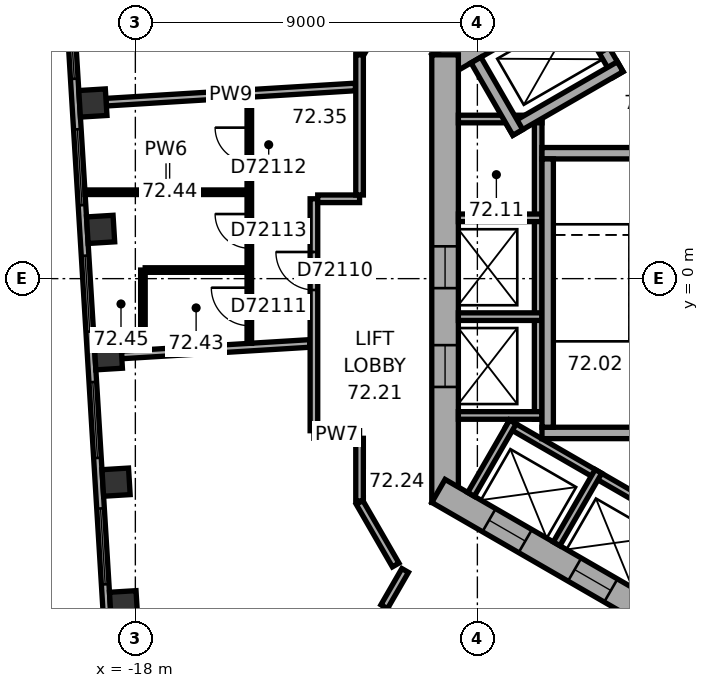
"""IFC4 building model, lengths in metres.
Left out: names, types, materials, properties, quantities, classifications, styles, units other than length and angle.
Written with IfcOpenShell. Run it as: python <this file> out.ifc"""

import sys

from ifc_helpers import new_model, si_unit, direction, frame, frame_2d, origin, origin_2d, place, context, subcontext, project, spatial, rectangle, extrude, element, fill, save


model = new_model("IFC4")
c1 = context("Model", 3, precision=1e-05, world=origin(), true_north=direction((0.0, 1.0)))
c2 = subcontext(c1, "Body", "Model", "MODEL_VIEW")
j1 = project(units=[si_unit("LENGTHUNIT", "METRE"), si_unit("PLANEANGLEUNIT", "RADIAN")], contexts=[c1])
p1 = place(None, origin())
s1 = spatial("IfcSite", under=j1, at=p1, CompositionType="ELEMENT")
p2 = place(p1, origin())
s2 = spatial("IfcBuilding", under=s1, at=p2, CompositionType="ELEMENT")
p3 = place(p2, frame((0.0, 0.0, 293.1)))
s3 = spatial("IfcBuildingStorey", under=s2, at=p3, CompositionType="ELEMENT", Elevation=293.1)
for number, where, z_axis, x_axis in (
    (1, (-19.118, 4.621, 0.0), (0.0, 0.0, 1.0), (0.061, -0.998, 0.0)),
    (2, (-18.914, 1.296, 0.0), (0.0, 0.0, 1.0), (0.061, -0.998, 0.0)),
    (3, (-18.711, -2.03, 0.0), (0.0, 0.0, 1.0), (0.061, -0.998, 0.0)),
    (4, (-18.508, -5.355, 0.0), (0.0, 0.0, 1.0), (0.061, -0.998, 0.0)),
):
    element("IfcColumn", number, at=place(p3, frame(where, z_axis=z_axis, x_axis=x_axis)), inside=s3, PredefinedType="COLUMN", context=c2, shape_type="SweptSolid", body=[
        extrude(rectangle(XDim=0.7, YDim=0.7, at=origin_2d()), origin(), (0.0, 0.0, 1.0), 3.7),
    ])
p4 = place(p3, frame((-18.304, -8.68, 0.0), z_axis=(0.0, 0.0, 1.0), x_axis=(0.061048539535, -0.998134798422, 0.0)))
e5 = element("IfcColumn", 5, at=p4, inside=s3, PredefinedType="COLUMN", context=c2, shape_type="SweptSolid", body=[
    extrude(rectangle(XDim=0.9, YDim=0.7, at=origin_2d()), origin(), (0.0, 0.0, 1.0), 3.7),
])
p5 = place(p3, frame((0.175, 11.475, 0.0), z_axis=(0.0, 0.0, 1.0), x_axis=(-0.866026453023, -0.499998182661, 0.0)))
e6 = element("IfcWall", 6, at=p5, inside=s3, PredefinedType="SHEAR", context=c2, shape_type="SweptSolid", body=[
    extrude(rectangle(XDim=11.778, YDim=0.7, at=frame_2d((5.889, 0.0))), origin(), (0.0, 0.0, 1.0), 3.7),
])
p6 = place(p5, frame((6.089, 0.0, 0.0)))
e7 = element("IfcOpeningElement", 7, at=p6, cuts=e6, PredefinedType="OPENING", context=c2, shape_type="SweptSolid", body=[
    extrude(rectangle(XDim=1.5, YDim=2.1, at=frame_2d((0.75, 1.05))), frame((0.0, 0.36, 0.0), z_axis=(0.0, -1.0, 0.0), x_axis=(1.0, 0.0, 0.0)), (0.0, 0.0, 1.0), 0.72),
])
p7 = place(p5, frame((2.939, 0.0, 0.0)))
e8 = element("IfcOpeningElement", 8, at=p7, cuts=e6, PredefinedType="OPENING", context=c2, shape_type="SweptSolid", body=[
    extrude(rectangle(XDim=0.9, YDim=2.1, at=frame_2d((0.45, 1.05))), frame((0.0, 0.36, 0.0), z_axis=(0.0, -1.0, 0.0), x_axis=(1.0, 0.0, 0.0)), (0.0, 0.0, 1.0), 0.72),
])
p8 = place(p3, frame((-9.85, 5.889, 0.0), z_axis=(0.0, 0.0, 1.0), x_axis=(0.0, -1.0, 0.0)))
e9 = element("IfcWall", 9, at=p8, inside=s3, PredefinedType="SHEAR", context=c2, shape_type="SweptSolid", body=[
    extrude(rectangle(XDim=11.778, YDim=0.7, at=frame_2d((5.889, 0.0))), origin(), (0.0, 0.0, 1.0), 3.7),
])
p9 = place(p8, frame((5.039, 0.0, 0.0)))
e10 = element("IfcOpeningElement", 10, at=p9, cuts=e9, PredefinedType="OPENING", context=c2, shape_type="SweptSolid", body=[
    extrude(rectangle(XDim=1.1, YDim=2.1, at=frame_2d((0.55, 1.05))), frame((0.0, 0.36, 0.0), z_axis=(0.0, -1.0, 0.0), x_axis=(1.0, 0.0, 0.0)), (0.0, 0.0, 1.0), 0.72),
])
p10 = place(p8, frame((7.639, 0.0, 0.0)))
e11 = element("IfcOpeningElement", 11, at=p10, cuts=e9, PredefinedType="OPENING", context=c2, shape_type="SweptSolid", body=[
    extrude(rectangle(XDim=1.1, YDim=2.1, at=frame_2d((0.55, 1.05))), frame((0.0, 0.36, 0.0), z_axis=(0.0, -1.0, 0.0), x_axis=(1.0, 0.0, 0.0)), (0.0, 0.0, 1.0), 0.72),
])
p11 = place(p3, frame((-10.025, -5.586, 0.0), z_axis=(0.0, 0.0, 1.0), x_axis=(0.866026453023, -0.499998182661, 0.0)))
e12 = element("IfcWall", 12, at=p11, inside=s3, PredefinedType="SHEAR", context=c2, shape_type="SweptSolid", body=[
    extrude(rectangle(XDim=11.778, YDim=0.7, at=frame_2d((5.889, 0.0))), origin(), (0.0, 0.0, 1.0), 3.7),
])
p12 = place(p11, frame((6.089, 0.0, 0.0)))
e13 = element("IfcOpeningElement", 13, at=p12, cuts=e12, PredefinedType="OPENING", context=c2, shape_type="SweptSolid", body=[
    extrude(rectangle(XDim=1.5, YDim=2.1, at=frame_2d((0.75, 1.05))), frame((0.0, 0.36, 0.0), z_axis=(0.0, -1.0, 0.0), x_axis=(1.0, 0.0, 0.0)), (0.0, 0.0, 1.0), 0.72),
])
p13 = place(p11, frame((1.539, 0.0, 0.0)))
e14 = element("IfcOpeningElement", 14, at=p13, cuts=e12, PredefinedType="OPENING", context=c2, shape_type="SweptSolid", body=[
    extrude(rectangle(XDim=1.1, YDim=2.1, at=frame_2d((0.55, 1.05))), frame((0.0, 0.36, 0.0), z_axis=(0.0, -1.0, 0.0), x_axis=(1.0, 0.0, 0.0)), (0.0, 0.0, 1.0), 0.72),
])
p14 = place(p11, frame((4.139, 0.0, 0.0)))
e15 = element("IfcOpeningElement", 15, at=p14, cuts=e12, PredefinedType="OPENING", context=c2, shape_type="SweptSolid", body=[
    extrude(rectangle(XDim=1.1, YDim=2.1, at=frame_2d((0.55, 1.05))), frame((0.0, 0.36, 0.0), z_axis=(0.0, -1.0, 0.0), x_axis=(1.0, 0.0, 0.0)), (0.0, 0.0, 1.0), 0.72),
])
p15 = place(p3, frame((-19.803, 8.454, 0.0), z_axis=(0.0, 0.0, 1.0), x_axis=(0.061036717565, -0.998135521414, 0.0)))
e16 = element("IfcWall", 16, at=p15, inside=s3, PredefinedType="STANDARD", context=c2, shape_type="SweptSolid", body=[
    extrude(rectangle(XDim=17.731, YDim=0.2, at=frame_2d((8.866, 0.0))), origin(), (0.0, 0.0, 1.0), 3.7),
])
p16 = place(p15, frame((1.202, 0.0, 0.9)))
e17 = element("IfcOpeningElement", 17, at=p16, cuts=e16, PredefinedType="OPENING", context=c2, shape_type="SweptSolid", body=[
    extrude(rectangle(XDim=2.0, YDim=2.0, at=frame_2d((1.0, 1.0))), frame((0.0, 0.11, 0.0), z_axis=(0.0, -1.0, 0.0), x_axis=(1.0, 0.0, 0.0)), (0.0, 0.0, 1.0), 0.22),
])
p17 = place(p15, frame((4.533, 0.0, 0.9)))
e18 = element("IfcOpeningElement", 18, at=p17, cuts=e16, PredefinedType="OPENING", context=c2, shape_type="SweptSolid", body=[
    extrude(rectangle(XDim=2.0, YDim=2.0, at=frame_2d((1.0, 1.0))), frame((0.0, 0.11, 0.0), z_axis=(0.0, -1.0, 0.0), x_axis=(1.0, 0.0, 0.0)), (0.0, 0.0, 1.0), 0.22),
])
p18 = place(p15, frame((7.865, 0.0, 0.9)))
e19 = element("IfcOpeningElement", 19, at=p18, cuts=e16, PredefinedType="OPENING", context=c2, shape_type="SweptSolid", body=[
    extrude(rectangle(XDim=2.0, YDim=2.0, at=frame_2d((1.0, 1.0))), frame((0.0, 0.11, 0.0), z_axis=(0.0, -1.0, 0.0), x_axis=(1.0, 0.0, 0.0)), (0.0, 0.0, 1.0), 0.22),
])
p19 = place(p15, frame((11.197, 0.0, 0.9)))
e20 = element("IfcOpeningElement", 20, at=p19, cuts=e16, PredefinedType="OPENING", context=c2, shape_type="SweptSolid", body=[
    extrude(rectangle(XDim=2.0, YDim=2.0, at=frame_2d((1.0, 1.0))), frame((0.0, 0.11, 0.0), z_axis=(0.0, -1.0, 0.0), x_axis=(1.0, 0.0, 0.0)), (0.0, 0.0, 1.0), 0.22),
])
p20 = place(p15, frame((14.528, 0.0, 0.9)))
e21 = element("IfcOpeningElement", 21, at=p20, cuts=e16, PredefinedType="OPENING", context=c2, shape_type="SweptSolid", body=[
    extrude(rectangle(XDim=2.0, YDim=2.0, at=frame_2d((1.0, 1.0))), frame((0.0, 0.11, 0.0), z_axis=(0.0, -1.0, 0.0), x_axis=(1.0, 0.0, 0.0)), (0.0, 0.0, 1.0), 0.22),
])
p21 = place(p3, frame((-7.4, 4.3, 0.0), z_axis=(0.0, 0.0, 1.0), x_axis=(0.0, -1.0, 0.0)))
e22 = element("IfcWall", 22, at=p21, inside=s3, PredefinedType="PARTITIONING", context=c2, shape_type="SweptSolid", body=[
    extrude(rectangle(XDim=8.0, YDim=0.2, at=frame_2d((4.0, 0.0))), origin(), (0.0, 0.0, 1.0), 3.42),
])
for number, where, z_axis, x_axis in (
    (23, (-7.3, 4.2, 0.0), (0.0, 0.0, 1.0), (-1.0, 0.0, 0.0)),
    (24, (-7.3, 1.6, 0.0), (0.0, 0.0, 1.0), (-1.0, 0.0, 0.0)),
    (25, (-7.3, -1.0, 0.0), (0.0, 0.0, 1.0), (-1.0, 0.0, 0.0)),
    (26, (-7.3, -3.6, 0.0), (0.0, 0.0, 1.0), (-1.0, 0.0, 0.0)),
):
    element("IfcWall", number, at=place(p3, frame(where, z_axis=z_axis, x_axis=x_axis)), inside=s3, PredefinedType="PARTITIONING", context=c2, shape_type="SweptSolid", body=[
        extrude(rectangle(XDim=2.2, YDim=0.2, at=frame_2d((1.1, 0.0))), origin(), (0.0, 0.0, 1.0), 3.42),
    ])
p22 = place(p3, frame((-8.203, -3.809, 0.0), z_axis=(0.0, 0.0, 1.0), x_axis=(0.866028230842, -0.499995103361, 0.0)))
e27 = element("IfcWall", 27, at=p22, inside=s3, PredefinedType="PARTITIONING", context=c2, shape_type="SweptSolid", body=[
    extrude(rectangle(XDim=5.4, YDim=0.2, at=frame_2d((2.7, 0.0))), origin(), (0.0, 0.0, 1.0), 3.42),
])
for number, where, z_axis, x_axis in (
    (28, (-8.067, -3.772, 0.0), (0.0, 0.0, 1.0), (-0.5, -0.866, 0.0)),
    (29, (-5.815, -5.072, 0.0), (0.0, 0.0, 1.0), (-0.5, -0.866, 0.0)),
):
    element("IfcWall", number, at=place(p3, frame(where, z_axis=z_axis, x_axis=x_axis)), inside=s3, PredefinedType="PARTITIONING", context=c2, shape_type="SweptSolid", body=[
        extrude(rectangle(XDim=2.2, YDim=0.2, at=frame_2d((1.1, 0.0))), origin(), (0.0, 0.0, 1.0), 3.42),
    ])
p23 = place(p3, frame((-2.6, 3.3, 0.0), z_axis=(0.0, 0.0, 1.0), x_axis=(-1.0, 0.0, 0.0)))
e30 = element("IfcWall", 30, at=p23, inside=s3, PredefinedType="SHEAR", context=c2, shape_type="SweptSolid", body=[
    extrude(rectangle(XDim=4.7, YDim=0.3, at=frame_2d((2.35, 0.0))), origin(), (0.0, 0.0, 1.0), 3.42),
])
p24 = place(p23, frame((0.8, 0.0, 0.0)))
e31 = element("IfcOpeningElement", 31, at=p24, cuts=e30, PredefinedType="OPENING", context=c2, shape_type="SweptSolid", body=[
    extrude(rectangle(XDim=1.2, YDim=2.1, at=frame_2d((0.6, 1.05))), frame((0.0, 0.16, 0.0), z_axis=(0.0, -1.0, 0.0), x_axis=(1.0, 0.0, 0.0)), (0.0, 0.0, 1.0), 0.32),
])
p25 = place(p3, frame((-2.6, -4.06, 0.0), z_axis=(0.0, 0.0, 1.0), x_axis=(-1.0, 0.0, 0.0)))
e32 = element("IfcWall", 32, at=p25, inside=s3, PredefinedType="SHEAR", context=c2, shape_type="SweptSolid", body=[
    extrude(rectangle(XDim=4.7, YDim=0.3, at=frame_2d((2.35, 0.0))), origin(), (0.0, 0.0, 1.0), 3.42),
])
p26 = place(p3, frame((-7.15, 3.15, 0.0), z_axis=(0.0, 0.0, 1.0), x_axis=(0.0, -1.0, 0.0)))
e33 = element("IfcWall", 33, at=p26, inside=s3, PredefinedType="SHEAR", context=c2, shape_type="SweptSolid", body=[
    extrude(rectangle(XDim=7.06, YDim=0.3, at=frame_2d((3.53, 0.0))), origin(), (0.0, 0.0, 1.0), 3.42),
])
p27 = place(p3, frame((-5.295, 5.372, 0.0), z_axis=(0.0, 0.0, 1.0), x_axis=(-0.500077893725, 0.86598042715, 0.0)))
e34 = element("IfcWall", 34, at=p27, inside=s3, PredefinedType="SHEAR", context=c2, shape_type="SweptSolid", body=[
    extrude(rectangle(XDim=2.2, YDim=0.3, at=frame_2d((1.1, 0.0))), origin(), (0.0, 0.0, 1.0), 3.42),
])
p28 = place(p27, frame((0.7, 0.0, 0.0)))
e35 = element("IfcOpeningElement", 35, at=p28, cuts=e34, PredefinedType="OPENING", context=c2, shape_type="SweptSolid", body=[
    extrude(rectangle(XDim=1.1, YDim=2.1, at=frame_2d((0.55, 1.05))), frame((0.0, 0.16, 0.0), z_axis=(0.0, -1.0, 0.0), x_axis=(1.0, 0.0, 0.0)), (0.0, 0.0, 1.0), 0.32),
])
p29 = place(p3, frame((-5.24, 5.577, 0.0), z_axis=(0.0, 0.0, 1.0), x_axis=(-0.866014461049, -0.500018952895, 0.0)))
e36 = element("IfcWall", 36, at=p29, inside=s3, PredefinedType="SHEAR", context=c2, shape_type="SweptSolid", body=[
    extrude(rectangle(XDim=3.35, YDim=0.3, at=frame_2d((1.675, 0.0))), origin(), (0.0, 0.0, 1.0), 3.42),
])
p30 = place(p3, frame((-7.937, 3.847, 0.0), z_axis=(0.0, 0.0, 1.0), x_axis=(-0.50002983664, 0.866008176907, 0.0)))
e37 = element("IfcWall", 37, at=p30, inside=s3, PredefinedType="SHEAR", context=c2, shape_type="SweptSolid", body=[
    extrude(rectangle(XDim=2.2, YDim=0.3, at=frame_2d((1.1, 0.0))), origin(), (0.0, 0.0, 1.0), 3.42),
])
p31 = place(p3, frame((-19.324, 2.273, 0.0), z_axis=(0.0, 0.0, 1.0), x_axis=(1.0, 0.0, 0.0)))
e38 = element("IfcWall", 38, at=p31, inside=s3, PredefinedType="PARTITIONING", context=c2, shape_type="SweptSolid", body=[
    extrude(rectangle(XDim=4.263, YDim=0.12, at=frame_2d((2.132, 0.0))), origin(), (0.0, 0.0, 1.0), 3.42),
])
p32 = place(p3, frame((-18.768, 4.643, 0.0), z_axis=(0.0, 0.0, 1.0), x_axis=(0.99813496285, 0.0610458511, 0.0)))
e39 = element("IfcWall", 39, at=p32, inside=s3, PredefinedType="PARTITIONING", context=c2, shape_type="SweptSolid", body=[
    extrude(rectangle(XDim=6.571, YDim=0.2, at=frame_2d((3.285, 0.0))), origin(), (0.0, 0.0, 1.0), 3.42),
])
p33 = place(p3, frame((-18.362, -2.008, 0.0), z_axis=(0.0, 0.0, 1.0), x_axis=(0.998135748374, 0.061033005966, 0.0)))
e40 = element("IfcWall", 40, at=p33, inside=s3, PredefinedType="PARTITIONING", context=c2, shape_type="SweptSolid", body=[
    extrude(rectangle(XDim=4.96, YDim=0.2, at=frame_2d((2.48, 0.0))), origin(), (0.0, 0.0, 1.0), 3.42),
])
p34 = place(p3, frame((-17.801, 0.226, 0.0), z_axis=(0.0, 0.0, 1.0), x_axis=(0.0, -1.0, 0.0)))
e41 = element("IfcWall", 41, at=p34, inside=s3, PredefinedType="PARTITIONING", context=c2, shape_type="SweptSolid", body=[
    extrude(rectangle(XDim=2.1, YDim=0.12, at=frame_2d((1.05, 0.0))), origin(), (0.0, 0.0, 1.0), 3.42),
])
p35 = place(p3, frame((-15.061, 0.226, 0.0), z_axis=(0.0, 0.0, 1.0), x_axis=(-1.0, 0.0, 0.0)))
e42 = element("IfcWall", 42, at=p35, inside=s3, PredefinedType="PARTITIONING", context=c2, shape_type="SweptSolid", body=[
    extrude(rectangle(XDim=2.68, YDim=0.12, at=frame_2d((1.34, 0.0))), origin(), (0.0, 0.0, 1.0), 3.42),
])
p36 = place(p3, frame((-15.001, 4.773, 0.0), z_axis=(0.0, 0.0, 1.0), x_axis=(0.0, -1.0, 0.0)))
e43 = element("IfcWall", 43, at=p36, inside=s3, PredefinedType="PARTITIONING", context=c2, shape_type="SweptSolid", body=[
    extrude(rectangle(XDim=6.476, YDim=0.12, at=frame_2d((3.238, 0.0))), origin(), (0.0, 0.0, 1.0), 3.42),
])
p37 = place(p36, frame((5.011, 0.0, 0.0)))
e44 = element("IfcOpeningElement", 44, at=p37, cuts=e43, PredefinedType="OPENING", context=c2, shape_type="SweptSolid", body=[
    extrude(rectangle(XDim=1.0, YDim=2.1, at=frame_2d((0.5, 1.05))), frame((0.0, 0.07, 0.0), z_axis=(0.0, -1.0, 0.0), x_axis=(1.0, 0.0, 0.0)), (0.0, 0.0, 1.0), 0.14),
])
p38 = place(p36, frame((0.8, 0.0, 0.0)))
e45 = element("IfcOpeningElement", 45, at=p38, cuts=e43, PredefinedType="OPENING", context=c2, shape_type="SweptSolid", body=[
    extrude(rectangle(XDim=0.9, YDim=2.1, at=frame_2d((0.45, 1.05))), frame((0.0, 0.07, 0.0), z_axis=(0.0, -1.0, 0.0), x_axis=(1.0, 0.0, 0.0)), (0.0, 0.0, 1.0), 0.14),
])
p39 = place(p36, frame((3.073, 0.0, 0.0)))
e46 = element("IfcOpeningElement", 46, at=p39, cuts=e43, PredefinedType="OPENING", context=c2, shape_type="SweptSolid", body=[
    extrude(rectangle(XDim=0.9, YDim=2.1, at=frame_2d((0.45, 1.05))), frame((0.0, 0.07, 0.0), z_axis=(0.0, -1.0, 0.0), x_axis=(1.0, 0.0, 0.0)), (0.0, 0.0, 1.0), 0.14),
])
p40 = place(p3, frame((-13.301, -4.101, 0.0), z_axis=(0.0, 0.0, 1.0), x_axis=(1.0, 0.0, 0.0)))
e47 = element("IfcWall", 47, at=p40, inside=s3, PredefinedType="PARTITIONING", context=c2, shape_type="SweptSolid", body=[
    extrude(rectangle(XDim=1.201, YDim=0.2, at=frame_2d((0.601, 0.0))), origin(), (0.0, 0.0, 1.0), 3.42),
])
p41 = place(p3, frame((-13.301, 2.101, 0.0), z_axis=(0.0, 0.0, 1.0), x_axis=(0.0, -1.0, 0.0)))
e48 = element("IfcWall", 48, at=p41, inside=s3, PredefinedType="PARTITIONING", context=c2, shape_type="SweptSolid", body=[
    extrude(rectangle(XDim=6.102, YDim=0.2, at=frame_2d((3.051, 0.0))), origin(), (0.0, 0.0, 1.0), 3.42),
])
p42 = place(p41, frame((1.4, 0.0, 0.0)))
e49 = element("IfcOpeningElement", 49, at=p42, cuts=e48, PredefinedType="OPENING", context=c2, shape_type="SweptSolid", body=[
    extrude(rectangle(XDim=1.0, YDim=2.1, at=frame_2d((0.5, 1.05))), frame((0.0, 0.11, 0.0), z_axis=(0.0, -1.0, 0.0), x_axis=(1.0, 0.0, 0.0)), (0.0, 0.0, 1.0), 0.22),
])
p43 = place(p3, frame((-12.1, -5.889, 0.0), z_axis=(0.0, 0.0, 1.0), x_axis=(0.500063520245, -0.865988727248, 0.0)))
e50 = element("IfcWall", 50, at=p43, inside=s3, PredefinedType="PARTITIONING", context=c2, shape_type="SweptSolid", body=[
    extrude(rectangle(XDim=1.9, YDim=0.2, at=frame_2d((0.95, 0.0))), origin(), (0.0, 0.0, 1.0), 3.42),
])
p44 = place(p3, frame((-12.1, -4.201, 0.0), z_axis=(0.0, 0.0, 1.0), x_axis=(0.0, -1.0, 0.0)))
e51 = element("IfcWall", 51, at=p44, inside=s3, PredefinedType="PARTITIONING", context=c2, shape_type="SweptSolid", body=[
    extrude(rectangle(XDim=1.648, YDim=0.2, at=frame_2d((0.824, 0.0))), origin(), (0.0, 0.0, 1.0), 3.42),
])
p45 = place(p3, frame((-12.1, 2.101, 0.0), z_axis=(0.0, 0.0, 1.0), x_axis=(-1.0, 0.0, 0.0)))
e52 = element("IfcWall", 52, at=p45, inside=s3, PredefinedType="PARTITIONING", context=c2, shape_type="SweptSolid", body=[
    extrude(rectangle(XDim=1.101, YDim=0.2, at=frame_2d((0.55, 0.0))), origin(), (0.0, 0.0, 1.0), 3.42),
])
p46 = place(p3, frame((-12.1, 5.889, 0.0), z_axis=(0.0, 0.0, 1.0), x_axis=(0.0, -1.0, 0.0)))
e53 = element("IfcWall", 53, at=p46, inside=s3, PredefinedType="PARTITIONING", context=c2, shape_type="SweptSolid", body=[
    extrude(rectangle(XDim=3.688, YDim=0.2, at=frame_2d((1.844, 0.0))), origin(), (0.0, 0.0, 1.0), 3.42),
])
p47 = place(p3, frame((-11.501, -8.719, 0.0), z_axis=(0.0, 0.0, 1.0), x_axis=(0.866024434742, -0.500001678427, 0.0)))
e54 = element("IfcWall", 54, at=p47, inside=s3, PredefinedType="PARTITIONING", context=c2, shape_type="SweptSolid", body=[
    extrude(rectangle(XDim=4.718, YDim=0.2, at=frame_2d((2.359, 0.0))), origin(), (0.0, 0.0, 1.0), 3.42),
])
p48 = place(p3, frame((-11.15, 7.534, 0.0), z_axis=(0.0, 0.0, 1.0), x_axis=(-0.500063286585, -0.865988862174, 0.0)))
e55 = element("IfcWall", 55, at=p48, inside=s3, PredefinedType="PARTITIONING", context=c2, shape_type="SweptSolid", body=[
    extrude(rectangle(XDim=1.86, YDim=0.2, at=frame_2d((0.93, 0.0))), origin(), (0.0, 0.0, 1.0), 3.42),
])
p49 = place(p48, frame((0.43, 0.0, 0.0)))
e56 = element("IfcOpeningElement", 56, at=p49, cuts=e55, PredefinedType="OPENING", context=c2, shape_type="SweptSolid", body=[
    extrude(rectangle(XDim=1.0, YDim=2.1, at=frame_2d((0.5, 1.05))), frame((0.0, 0.11, 0.0), z_axis=(0.0, -1.0, 0.0), x_axis=(1.0, 0.0, 0.0)), (0.0, 0.0, 1.0), 0.22),
])
p50 = place(p3, frame((-10.901, -7.678, 0.0), z_axis=(0.0, 0.0, 1.0), x_axis=(-0.500074377092, -0.865982457891, 0.0)))
e57 = element("IfcWall", 57, at=p50, inside=s3, PredefinedType="PARTITIONING", context=c2, shape_type="SweptSolid", body=[
    extrude(rectangle(XDim=1.101, YDim=0.2, at=frame_2d((0.55, 0.0))), origin(), (0.0, 0.0, 1.0), 3.42),
])
p51 = place(p16, origin())
e58 = element("IfcWindow", 58, at=p51, inside=s3, PartitioningType="SINGLE_PANEL", PredefinedType="WINDOW", context=c2, shape_type="SweptSolid", body=[
    extrude(rectangle(XDim=2.0, YDim=2.0, at=frame_2d((1.0, 1.0))), frame((0.0, 0.03, 0.0), z_axis=(0.0, -1.0, 0.0), x_axis=(1.0, 0.0, 0.0)), (0.0, 0.0, 1.0), 0.06),
])
fill(e17, e58)
p52 = place(p17, origin())
e59 = element("IfcWindow", 59, at=p52, inside=s3, PartitioningType="SINGLE_PANEL", PredefinedType="WINDOW", context=c2, shape_type="SweptSolid", body=[
    extrude(rectangle(XDim=2.0, YDim=2.0, at=frame_2d((1.0, 1.0))), frame((0.0, 0.03, 0.0), z_axis=(0.0, -1.0, 0.0), x_axis=(1.0, 0.0, 0.0)), (0.0, 0.0, 1.0), 0.06),
])
fill(e18, e59)
p53 = place(p18, origin())
e60 = element("IfcWindow", 60, at=p53, inside=s3, PartitioningType="SINGLE_PANEL", PredefinedType="WINDOW", context=c2, shape_type="SweptSolid", body=[
    extrude(rectangle(XDim=2.0, YDim=2.0, at=frame_2d((1.0, 1.0))), frame((0.0, 0.03, 0.0), z_axis=(0.0, -1.0, 0.0), x_axis=(1.0, 0.0, 0.0)), (0.0, 0.0, 1.0), 0.06),
])
fill(e19, e60)
p54 = place(p19, origin())
e61 = element("IfcWindow", 61, at=p54, inside=s3, PartitioningType="SINGLE_PANEL", PredefinedType="WINDOW", context=c2, shape_type="SweptSolid", body=[
    extrude(rectangle(XDim=2.0, YDim=2.0, at=frame_2d((1.0, 1.0))), frame((0.0, 0.03, 0.0), z_axis=(0.0, -1.0, 0.0), x_axis=(1.0, 0.0, 0.0)), (0.0, 0.0, 1.0), 0.06),
])
fill(e20, e61)
p55 = place(p20, origin())
e62 = element("IfcWindow", 62, at=p55, inside=s3, PartitioningType="SINGLE_PANEL", PredefinedType="WINDOW", context=c2, shape_type="SweptSolid", body=[
    extrude(rectangle(XDim=2.0, YDim=2.0, at=frame_2d((1.0, 1.0))), frame((0.0, 0.03, 0.0), z_axis=(0.0, -1.0, 0.0), x_axis=(1.0, 0.0, 0.0)), (0.0, 0.0, 1.0), 0.06),
])
fill(e21, e62)
p56 = place(p9, origin())
e63 = element("IfcDoor", 63, at=p56, inside=s3, OperationType="DOUBLE_DOOR_SLIDING", PredefinedType="DOOR", context=c2, shape_type="SweptSolid", body=[
    extrude(rectangle(XDim=1.1, YDim=2.1, at=frame_2d((0.55, 1.05))), frame((0.0, 0.025, 0.0), z_axis=(0.0, -1.0, 0.0), x_axis=(1.0, 0.0, 0.0)), (0.0, 0.0, 1.0), 0.05),
])
fill(e10, e63)
p57 = place(p10, origin())
e64 = element("IfcDoor", 64, at=p57, inside=s3, OperationType="DOUBLE_DOOR_SLIDING", PredefinedType="DOOR", context=c2, shape_type="SweptSolid", body=[
    extrude(rectangle(XDim=1.1, YDim=2.1, at=frame_2d((0.55, 1.05))), frame((0.0, 0.025, 0.0), z_axis=(0.0, -1.0, 0.0), x_axis=(1.0, 0.0, 0.0)), (0.0, 0.0, 1.0), 0.05),
])
fill(e11, e64)
p58 = place(p13, origin())
e65 = element("IfcDoor", 65, at=p58, inside=s3, OperationType="DOUBLE_DOOR_SLIDING", PredefinedType="DOOR", context=c2, shape_type="SweptSolid", body=[
    extrude(rectangle(XDim=1.1, YDim=2.1, at=frame_2d((0.55, 1.05))), frame((0.0, 0.025, 0.0), z_axis=(0.0, -1.0, 0.0), x_axis=(1.0, 0.0, 0.0)), (0.0, 0.0, 1.0), 0.05),
])
fill(e14, e65)
p59 = place(p14, origin())
e66 = element("IfcDoor", 66, at=p59, inside=s3, OperationType="DOUBLE_DOOR_SLIDING", PredefinedType="DOOR", context=c2, shape_type="SweptSolid", body=[
    extrude(rectangle(XDim=1.1, YDim=2.1, at=frame_2d((0.55, 1.05))), frame((0.0, 0.025, 0.0), z_axis=(0.0, -1.0, 0.0), x_axis=(1.0, 0.0, 0.0)), (0.0, 0.0, 1.0), 0.05),
])
fill(e15, e66)
p60 = place(p42, origin())
e67 = element("IfcDoor", 67, at=p60, inside=s3, OperationType="SINGLE_SWING_LEFT", PredefinedType="DOOR", context=c2, shape_type="SweptSolid", body=[
    extrude(rectangle(XDim=1.0, YDim=2.1, at=frame_2d((0.5, 1.05))), frame((0.0, 0.025, 0.0), z_axis=(0.0, -1.0, 0.0), x_axis=(1.0, 0.0, 0.0)), (0.0, 0.0, 1.0), 0.05),
])
fill(e49, e67)
p61 = place(p37, origin())
e68 = element("IfcDoor", 68, at=p61, inside=s3, OperationType="SINGLE_SWING_LEFT", PredefinedType="DOOR", context=c2, shape_type="SweptSolid", body=[
    extrude(rectangle(XDim=1.0, YDim=2.1, at=frame_2d((0.5, 1.05))), frame((0.0, 0.025, 0.0), z_axis=(0.0, -1.0, 0.0), x_axis=(1.0, 0.0, 0.0)), (0.0, 0.0, 1.0), 0.05),
])
fill(e44, e68)
p62 = place(p38, origin())
e69 = element("IfcDoor", 69, at=p62, inside=s3, OperationType="SINGLE_SWING_LEFT", PredefinedType="DOOR", context=c2, shape_type="SweptSolid", body=[
    extrude(rectangle(XDim=0.9, YDim=2.1, at=frame_2d((0.45, 1.05))), frame((0.0, 0.025, 0.0), z_axis=(0.0, -1.0, 0.0), x_axis=(1.0, 0.0, 0.0)), (0.0, 0.0, 1.0), 0.05),
])
fill(e45, e69)
p63 = place(p39, origin())
e70 = element("IfcDoor", 70, at=p63, inside=s3, OperationType="SINGLE_SWING_LEFT", PredefinedType="DOOR", context=c2, shape_type="SweptSolid", body=[
    extrude(rectangle(XDim=0.9, YDim=2.1, at=frame_2d((0.45, 1.05))), frame((0.0, 0.025, 0.0), z_axis=(0.0, -1.0, 0.0), x_axis=(1.0, 0.0, 0.0)), (0.0, 0.0, 1.0), 0.05),
])
fill(e46, e70)
save(model, sys.argv[1])
